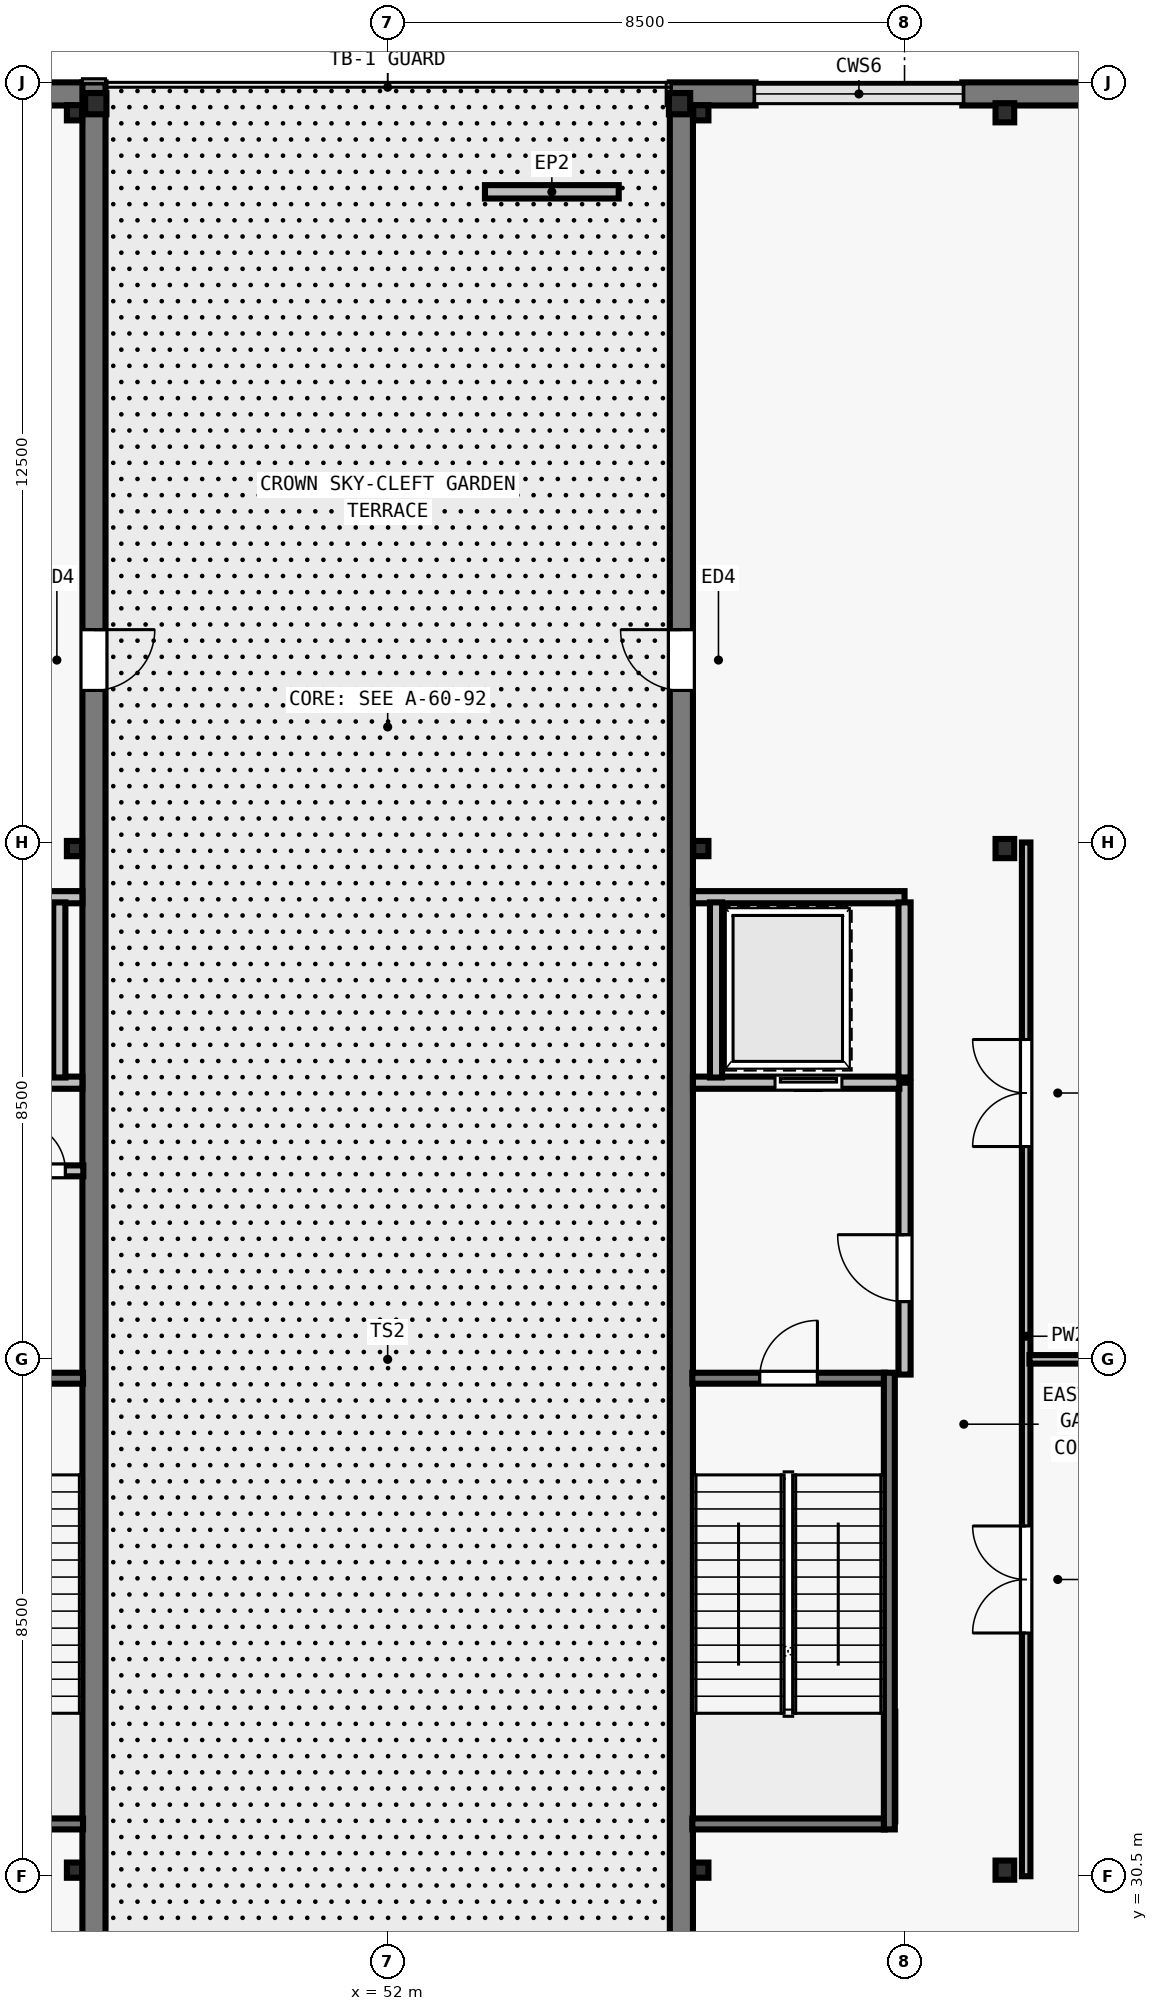
"""IFC4 building model, lengths in metres.
Left out: names, types, materials, properties, quantities, classifications, styles, units other than length and angle.
Written with IfcOpenShell. Run it as: python <this file> out.ifc"""

import sys

from ifc_helpers import new_model, si_unit, direction, frame, frame_2d, origin, origin_2d, place, context, subcontext, project, spatial, rectangle, i_section, extrude, element, fill, save


model = new_model("IFC4")
c1 = context("Model", 3, precision=1e-05, world=origin(), true_north=direction((0.0, 1.0)))
c2 = subcontext(c1, "Body", "Model", "MODEL_VIEW")
j1 = project(units=[si_unit("LENGTHUNIT", "METRE"), si_unit("PLANEANGLEUNIT", "RADIAN")], contexts=[c1])
p1 = place(None, origin())
s1 = spatial("IfcSite", under=j1, at=p1, CompositionType="ELEMENT")
p2 = place(p1, origin())
s2 = spatial("IfcBuilding", under=s1, at=p2, CompositionType="ELEMENT")
p3 = place(p2, frame((0.0, 0.0, 324.5)))
s3 = spatial("IfcBuildingStorey", under=s2, at=p3, CompositionType="ELEMENT", Elevation=324.5)
for number, where, z_axis, x_axis in (
    (1, (56.8, 59.65, 0.0), (0.0, 0.0, 1.0), (1.0, 0.0, 0.0)),
    (2, (47.2, 59.65, 0.0), (0.0, 0.0, 1.0), (1.0, 0.0, 0.0)),
):
    element("IfcColumn", number, at=place(p3, frame(where, z_axis=z_axis, x_axis=x_axis)), inside=s3, PredefinedType="COLUMN", context=c2, shape_type="SweptSolid", body=[
        extrude(i_section(OverallWidth=0.35, OverallDepth=0.35, WebThickness=0.02, FlangeThickness=0.028, at=origin_2d()), origin(), (0.0, 0.0, 1.0), 5.5),
    ])
for number, where, z_axis, x_axis in (
    (3, (46.85, 30.6, 0.0), (0.0, 0.0, 1.0), (1.0, 0.0, 0.0)),
    (4, (46.85, 47.4, 0.0), (0.0, 0.0, 1.0), (1.0, 0.0, 0.0)),
    (5, (46.85, 59.5, 0.0), (0.0, 0.0, 1.0), (1.0, 0.0, 0.0)),
):
    element("IfcColumn", number, at=place(p3, frame(where, z_axis=z_axis, x_axis=x_axis)), inside=s3, PredefinedType="PILASTER", context=c2, shape_type="SweptSolid", body=[
        extrude(i_section(OverallWidth=0.203, OverallDepth=0.203, WebThickness=0.009, FlangeThickness=0.014, FilletRadius=0.01, at=origin_2d()), origin(), (0.0, 0.0, 1.0), 5.5),
    ])
p4 = place(p3, frame((62.15, 30.6, 0.0), z_axis=(0.0, 0.0, 1.0), x_axis=(1.0, 0.0, 0.0)))
e6 = element("IfcColumn", 6, at=p4, inside=s3, PredefinedType="COLUMN", context=c2, shape_type="SweptSolid", body=[
    extrude(i_section(OverallWidth=0.307, OverallDepth=0.315, WebThickness=0.012, FlangeThickness=0.019, FilletRadius=0.016, at=origin_2d()), origin(), (0.0, 0.0, 1.0), 5.5),
])
p5 = place(p3, frame((57.15, 30.6, 0.0), z_axis=(0.0, 0.0, 1.0), x_axis=(1.0, 0.0, 0.0)))
e7 = element("IfcColumn", 7, at=p5, inside=s3, PredefinedType="PILASTER", context=c2, shape_type="SweptSolid", body=[
    extrude(i_section(OverallWidth=0.203, OverallDepth=0.203, WebThickness=0.009, FlangeThickness=0.014, FilletRadius=0.01, at=origin_2d()), origin(), (0.0, 0.0, 1.0), 5.5),
])
p6 = place(p3, frame((62.15, 47.4, 0.0), z_axis=(0.0, 0.0, 1.0), x_axis=(1.0, 0.0, 0.0)))
e8 = element("IfcColumn", 8, at=p6, inside=s3, PredefinedType="COLUMN", context=c2, shape_type="SweptSolid", body=[
    extrude(i_section(OverallWidth=0.307, OverallDepth=0.315, WebThickness=0.012, FlangeThickness=0.019, FilletRadius=0.016, at=origin_2d()), origin(), (0.0, 0.0, 1.0), 5.5),
])
p7 = place(p3, frame((57.15, 47.4, 0.0), z_axis=(0.0, 0.0, 1.0), x_axis=(1.0, 0.0, 0.0)))
e9 = element("IfcColumn", 9, at=p7, inside=s3, PredefinedType="PILASTER", context=c2, shape_type="SweptSolid", body=[
    extrude(i_section(OverallWidth=0.203, OverallDepth=0.203, WebThickness=0.009, FlangeThickness=0.014, FilletRadius=0.01, at=origin_2d()), origin(), (0.0, 0.0, 1.0), 5.5),
])
p8 = place(p3, frame((62.15, 59.5, 0.0), z_axis=(0.0, 0.0, 1.0), x_axis=(1.0, 0.0, 0.0)))
e10 = element("IfcColumn", 10, at=p8, inside=s3, PredefinedType="COLUMN", context=c2, shape_type="SweptSolid", body=[
    extrude(i_section(OverallWidth=0.307, OverallDepth=0.315, WebThickness=0.012, FlangeThickness=0.019, FilletRadius=0.016, at=origin_2d()), origin(), (0.0, 0.0, 1.0), 5.5),
])
p9 = place(p3, frame((57.15, 59.5, 0.0), z_axis=(0.0, 0.0, 1.0), x_axis=(1.0, 0.0, 0.0)))
e11 = element("IfcColumn", 11, at=p9, inside=s3, PredefinedType="PILASTER", context=c2, shape_type="SweptSolid", body=[
    extrude(i_section(OverallWidth=0.203, OverallDepth=0.203, WebThickness=0.009, FlangeThickness=0.014, FilletRadius=0.01, at=origin_2d()), origin(), (0.0, 0.0, 1.0), 5.5),
])
p10 = place(p3, frame((45.95, 59.81, 0.0), z_axis=(0.0, 0.0, 1.0), x_axis=(1.0, 0.0, 0.0)))
e12 = element("IfcWall", 12, at=p10, inside=s3, PredefinedType="SOLIDWALL", context=c2, shape_type="SweptSolid", body=[
    extrude(rectangle(XDim=1.052, YDim=0.38, at=frame_2d((0.526, 0.0))), origin(), (0.0, 0.0, 1.0), 5.25),
])
p11 = place(p3, frame((47.17, 60.0, 0.0), z_axis=(0.0, 0.0, 1.0), x_axis=(0.0, -1.0, 0.0)))
e13 = element("IfcWall", 13, at=p11, inside=s3, PredefinedType="SOLIDWALL", context=c2, shape_type="SweptSolid", body=[
    extrude(rectangle(XDim=41.642, YDim=0.38, at=frame_2d((20.821, 0.0))), origin(), (0.0, 0.0, 1.0), 5.25),
])
p12 = place(p11, frame((9.0, 0.0, 0.0)))
e14 = element("IfcOpeningElement", 14, at=p12, cuts=e13, PredefinedType="OPENING", context=c2, shape_type="SweptSolid", body=[
    extrude(rectangle(XDim=1.0, YDim=2.15, at=frame_2d((0.5, 1.075))), frame((0.0, 0.2, 0.0), z_axis=(0.0, -1.0, 0.0), x_axis=(1.0, 0.0, 0.0)), (0.0, 0.0, 1.0), 0.4),
])
p13 = place(p11, frame((33.0, 0.0, 0.0)))
e15 = element("IfcOpeningElement", 15, at=p13, cuts=e13, PredefinedType="OPENING", context=c2, shape_type="SweptSolid", body=[
    extrude(rectangle(XDim=1.0, YDim=2.15, at=frame_2d((0.5, 1.075))), frame((0.0, 0.2, 0.0), z_axis=(0.0, -1.0, 0.0), x_axis=(1.0, 0.0, 0.0)), (0.0, 0.0, 1.0), 0.4),
])
p14 = place(p3, frame((56.83, 18.0, 0.0), z_axis=(0.0, 0.0, 1.0), x_axis=(0.0, 1.0, 0.0)))
e16 = element("IfcWall", 16, at=p14, inside=s3, PredefinedType="SOLIDWALL", context=c2, shape_type="SweptSolid", body=[
    extrude(rectangle(XDim=41.642, YDim=0.38, at=frame_2d((20.821, 0.0))), origin(), (0.0, 0.0, 1.0), 5.25),
])
p15 = place(p14, frame((32.0, 0.0, 0.0)))
e17 = element("IfcOpeningElement", 17, at=p15, cuts=e16, PredefinedType="OPENING", context=c2, shape_type="SweptSolid", body=[
    extrude(rectangle(XDim=1.0, YDim=2.15, at=frame_2d((0.5, 1.075))), frame((0.0, 0.2, 0.0), z_axis=(0.0, -1.0, 0.0), x_axis=(1.0, 0.0, 0.0)), (0.0, 0.0, 1.0), 0.4),
])
p16 = place(p14, frame((8.0, 0.0, 0.0)))
e18 = element("IfcOpeningElement", 18, at=p16, cuts=e16, PredefinedType="OPENING", context=c2, shape_type="SweptSolid", body=[
    extrude(rectangle(XDim=1.0, YDim=2.15, at=frame_2d((0.5, 1.075))), frame((0.0, 0.2, 0.0), z_axis=(0.0, -1.0, 0.0), x_axis=(1.0, 0.0, 0.0)), (0.0, 0.0, 1.0), 0.4),
])
p17 = place(p3, frame((56.64, 59.81, 0.0), z_axis=(0.0, 0.0, 1.0), x_axis=(1.0, 0.0, 0.0)))
e19 = element("IfcWall", 19, at=p17, inside=s3, PredefinedType="SOLIDWALL", context=c2, shape_type="SweptSolid", body=[
    extrude(rectangle(XDim=1.41, YDim=0.38, at=frame_2d((0.705, 0.0))), origin(), (0.0, 0.0, 1.0), 5.25),
])
p18 = place(p3, frame((61.45, 59.81, 0.0), z_axis=(0.0, 0.0, 1.0), x_axis=(1.0, 0.0, 0.0)))
e20 = element("IfcWall", 20, at=p18, inside=s3, PredefinedType="SOLIDWALL", context=c2, shape_type="SweptSolid", body=[
    extrude(rectangle(XDim=5.692, YDim=0.38, at=frame_2d((2.846, 0.0))), origin(), (0.0, 0.0, 1.0), 5.25),
])
p19 = place(p3, frame((53.6, 58.2, 0.0), z_axis=(0.0, 0.0, 1.0), x_axis=(1.0, 0.0, 0.0)))
e21 = element("IfcWall", 21, at=p19, inside=s3, PredefinedType="PARAPET", context=c2, shape_type="SweptSolid", body=[
    extrude(rectangle(XDim=2.2, YDim=0.22, at=frame_2d((1.1, 0.0))), origin(), (0.0, 0.0, 1.0), 0.55),
])
p20 = place(p3, frame((43.585, 43.55, 0.0), z_axis=(0.0, 0.0, 1.0), x_axis=(1.0, 0.0, 0.0)))
e22 = element("IfcWall", 22, at=p20, inside=s3, PredefinedType="SOLIDWALL", context=c2, shape_type="SweptSolid", body=[
    extrude(rectangle(XDim=3.395, YDim=0.2, at=frame_2d((1.698, 0.0))), origin(), (0.0, 0.0, 1.0), 5.25),
])
p21 = place(p20, frame((0.265, 0.0, 0.0)))
e23 = element("IfcOpeningElement", 23, at=p21, cuts=e22, PredefinedType="OPENING", context=c2, shape_type="SweptSolid", body=[
    extrude(rectangle(XDim=1.1, YDim=2.2, at=frame_2d((0.55, 1.1))), frame((0.0, 0.11, 0.0), z_axis=(0.0, -1.0, 0.0), x_axis=(1.0, 0.0, 0.0)), (0.0, 0.0, 1.0), 0.22),
])
p22 = place(p3, frame((43.5, 46.6, 0.0), z_axis=(0.0, 0.0, 1.0), x_axis=(1.0, 0.0, 0.0)))
e24 = element("IfcWall", 24, at=p22, inside=s3, PredefinedType="SOLIDWALL", context=c2, shape_type="SweptSolid", body=[
    extrude(rectangle(XDim=3.48, YDim=0.2, at=frame_2d((1.74, 0.0))), origin(), (0.0, 0.0, 1.0), 5.25),
])
p23 = place(p3, frame((46.6, 43.635, 0.0), z_axis=(0.0, 0.0, 1.0), x_axis=(0.0, 1.0, 0.0)))
e25 = element("IfcWall", 25, at=p23, inside=s3, PredefinedType="SOLIDWALL", context=c2, shape_type="SweptSolid", body=[
    extrude(rectangle(XDim=2.88, YDim=0.2, at=frame_2d((1.44, 0.0))), origin(), (0.0, 0.0, 1.0), 5.25),
])
p24 = place(p3, frame((45.55, 42.1, 0.0), z_axis=(0.0, 0.0, 1.0), x_axis=(1.0, 0.0, 0.0)))
e26 = element("IfcWall", 26, at=p24, inside=s3, PredefinedType="SOLIDWALL", context=c2, shape_type="SweptSolid", body=[
    extrude(rectangle(XDim=1.445, YDim=0.18, at=frame_2d((0.723, 0.0))), origin(), (0.0, 0.0, 1.0), 5.25),
])
p25 = place(p24, frame((0.35, 0.0, 0.0)))
e27 = element("IfcOpeningElement", 27, at=p25, cuts=e26, PredefinedType="OPENING", context=c2, shape_type="SweptSolid", body=[
    extrude(rectangle(XDim=0.8, YDim=2.08, at=frame_2d((0.4, 1.04))), frame((0.0, 0.1, 0.0), z_axis=(0.0, -1.0, 0.0), x_axis=(1.0, 0.0, 0.0)), (0.0, 0.0, 1.0), 0.2),
])
p26 = place(p3, frame((60.5, 38.75, 0.0), z_axis=(0.0, 0.0, 1.0), x_axis=(0.0, 1.0, 0.0)))
e28 = element("IfcWall", 28, at=p26, inside=s3, PredefinedType="SOLIDWALL", context=c2, shape_type="SweptSolid", body=[
    extrude(rectangle(XDim=4.8, YDim=0.2, at=frame_2d((2.4, 0.0))), origin(), (0.0, 0.0, 1.0), 5.25),
])
p27 = place(p26, frame((1.2, 0.0, 0.0)))
e29 = element("IfcOpeningElement", 29, at=p27, cuts=e28, PredefinedType="OPENING", context=c2, shape_type="SweptSolid", body=[
    extrude(rectangle(XDim=1.1, YDim=2.15, at=frame_2d((0.55, 1.075))), frame((0.0, 0.11, 0.0), z_axis=(0.0, -1.0, 0.0), x_axis=(1.0, 0.0, 0.0)), (0.0, 0.0, 1.0), 0.22),
])
p28 = place(p3, frame((57.02, 43.55, 0.0), z_axis=(0.0, 0.0, 1.0), x_axis=(1.0, 0.0, 0.0)))
e30 = element("IfcWall", 30, at=p28, inside=s3, PredefinedType="SOLIDWALL", context=c2, shape_type="SweptSolid", body=[
    extrude(rectangle(XDim=3.395, YDim=0.2, at=frame_2d((1.698, 0.0))), origin(), (0.0, 0.0, 1.0), 5.25),
])
p29 = place(p28, frame((1.35, 0.0, 0.0)))
e31 = element("IfcOpeningElement", 31, at=p29, cuts=e30, PredefinedType="OPENING", context=c2, shape_type="SweptSolid", body=[
    extrude(rectangle(XDim=1.1, YDim=2.2, at=frame_2d((0.55, 1.1))), frame((0.0, 0.11, 0.0), z_axis=(0.0, -1.0, 0.0), x_axis=(1.0, 0.0, 0.0)), (0.0, 0.0, 1.0), 0.22),
])
p30 = place(p3, frame((57.02, 46.6, 0.0), z_axis=(0.0, 0.0, 1.0), x_axis=(1.0, 0.0, 0.0)))
e32 = element("IfcWall", 32, at=p30, inside=s3, PredefinedType="SOLIDWALL", context=c2, shape_type="SweptSolid", body=[
    extrude(rectangle(XDim=3.48, YDim=0.2, at=frame_2d((1.74, 0.0))), origin(), (0.0, 0.0, 1.0), 5.25),
])
for number, where, z_axis, x_axis in (
    (33, (57.4, 43.635, 0.0), (0.0, 0.0, 1.0), (0.0, 1.0, 0.0)),
    (34, (60.5, 43.635, 0.0), (0.0, 0.0, 1.0), (0.0, 1.0, 0.0)),
):
    element("IfcWall", number, at=place(p3, frame(where, z_axis=z_axis, x_axis=x_axis)), inside=s3, PredefinedType="SOLIDWALL", context=c2, shape_type="SweptSolid", body=[
        extrude(rectangle(XDim=2.88, YDim=0.2, at=frame_2d((1.44, 0.0))), origin(), (0.0, 0.0, 1.0), 5.25),
    ])
p31 = place(p3, frame((62.5, 30.5, 0.0), z_axis=(0.0, 0.0, 1.0), x_axis=(0.0, 1.0, 0.0)))
e35 = element("IfcWall", 35, at=p31, inside=s3, PredefinedType="PARTITIONING", context=c2, shape_type="SweptSolid", body=[
    extrude(rectangle(XDim=17.0, YDim=0.14, at=frame_2d((8.5, 0.0))), origin(), (0.0, 0.0, 1.0), 5.25),
])
p32 = place(p31, frame((4.0, 0.0, 0.0)))
e36 = element("IfcOpeningElement", 36, at=p32, cuts=e35, PredefinedType="OPENING", context=c2, shape_type="SweptSolid", body=[
    extrude(rectangle(XDim=1.76, YDim=2.2, at=frame_2d((0.88, 1.1))), frame((0.0, 0.08, 0.0), z_axis=(0.0, -1.0, 0.0), x_axis=(1.0, 0.0, 0.0)), (0.0, 0.0, 1.0), 0.16),
])
p33 = place(p31, frame((12.0, 0.0, 0.0)))
e37 = element("IfcOpeningElement", 37, at=p33, cuts=e35, PredefinedType="OPENING", context=c2, shape_type="SweptSolid", body=[
    extrude(rectangle(XDim=1.76, YDim=2.2, at=frame_2d((0.88, 1.1))), frame((0.0, 0.08, 0.0), z_axis=(0.0, -1.0, 0.0), x_axis=(1.0, 0.0, 0.0)), (0.0, 0.0, 1.0), 0.16),
])
p34 = place(p3, frame((62.555, 39.0, 0.0), z_axis=(0.0, 0.0, 1.0), x_axis=(1.0, 0.0, 0.0)))
e38 = element("IfcWall", 38, at=p34, inside=s3, PredefinedType="PARTITIONING", context=c2, shape_type="SweptSolid", body=[
    extrude(rectangle(XDim=10.08, YDim=0.14, at=frame_2d((5.04, 0.0))), origin(), (0.0, 0.0, 1.0), 5.25),
])
p35 = place(p3, frame((43.825, 38.69, 0.0), z_axis=(0.0, 0.0, 1.0), x_axis=(1.0, 0.0, 0.0)))
e39 = element("IfcWall", 39, at=p35, inside=s3, PredefinedType="SOLIDWALL", context=c2, shape_type="SweptSolid", body=[
    extrude(rectangle(XDim=3.165, YDim=0.18, at=frame_2d((1.583, 0.0))), origin(), (0.0, 0.0, 1.0), 5.25),
])
p36 = place(p35, frame((1.107, 0.0, 0.0)))
e40 = element("IfcOpeningElement", 40, at=p36, cuts=e39, PredefinedType="OPENING", context=c2, shape_type="SweptSolid", body=[
    extrude(rectangle(XDim=0.95, YDim=2.15, at=frame_2d((0.475, 1.075))), frame((0.0, 0.1, 0.0), z_axis=(0.0, -1.0, 0.0), x_axis=(1.0, 0.0, 0.0)), (0.0, 0.0, 1.0), 0.2),
])
p37 = place(p3, frame((43.825, 31.36, 0.0), z_axis=(0.0, 0.0, 1.0), x_axis=(1.0, 0.0, 0.0)))
e41 = element("IfcWall", 41, at=p37, inside=s3, PredefinedType="SOLIDWALL", context=c2, shape_type="SweptSolid", body=[
    extrude(rectangle(XDim=3.165, YDim=0.18, at=frame_2d((1.583, 0.0))), origin(), (0.0, 0.0, 1.0), 5.25),
])
p38 = place(p3, frame((57.01, 38.69, 0.0), z_axis=(0.0, 0.0, 1.0), x_axis=(1.0, 0.0, 0.0)))
e42 = element("IfcWall", 42, at=p38, inside=s3, PredefinedType="SOLIDWALL", context=c2, shape_type="SweptSolid", body=[
    extrude(rectangle(XDim=3.165, YDim=0.18, at=frame_2d((1.583, 0.0))), origin(), (0.0, 0.0, 1.0), 5.25),
])
p39 = place(p38, frame((1.107, 0.0, 0.0)))
e43 = element("IfcOpeningElement", 43, at=p39, cuts=e42, PredefinedType="OPENING", context=c2, shape_type="SweptSolid", body=[
    extrude(rectangle(XDim=0.95, YDim=2.15, at=frame_2d((0.475, 1.075))), frame((0.0, 0.1, 0.0), z_axis=(0.0, -1.0, 0.0), x_axis=(1.0, 0.0, 0.0)), (0.0, 0.0, 1.0), 0.2),
])
p40 = place(p3, frame((57.01, 31.36, 0.0), z_axis=(0.0, 0.0, 1.0), x_axis=(1.0, 0.0, 0.0)))
e44 = element("IfcWall", 44, at=p40, inside=s3, PredefinedType="SOLIDWALL", context=c2, shape_type="SweptSolid", body=[
    extrude(rectangle(XDim=3.165, YDim=0.18, at=frame_2d((1.583, 0.0))), origin(), (0.0, 0.0, 1.0), 5.25),
])
p41 = place(p3, frame((60.25, 38.78, 0.0), z_axis=(0.0, 0.0, 1.0), x_axis=(0.0, -1.0, 0.0)))
e45 = element("IfcWall", 45, at=p41, inside=s3, PredefinedType="SOLIDWALL", context=c2, shape_type="SweptSolid", body=[
    extrude(rectangle(XDim=7.51, YDim=0.18, at=frame_2d((3.755, 0.0))), origin(), (0.0, 0.0, 1.0), 5.25),
])
p42 = place(p12, origin())
e46 = element("IfcDoor", 46, at=p42, inside=s3, OperationType="SINGLE_SWING_LEFT", PredefinedType="DOOR", context=c2, shape_type="SweptSolid", body=[
    extrude(rectangle(XDim=1.0, YDim=2.15, at=frame_2d((0.5, 1.075))), frame((0.0, 0.025, 0.0), z_axis=(0.0, -1.0, 0.0), x_axis=(1.0, 0.0, 0.0)), (0.0, 0.0, 1.0), 0.05),
])
fill(e14, e46)
p43 = place(p15, origin())
e47 = element("IfcDoor", 47, at=p43, inside=s3, OperationType="SINGLE_SWING_RIGHT", PredefinedType="DOOR", context=c2, shape_type="SweptSolid", body=[
    extrude(rectangle(XDim=1.0, YDim=2.15, at=frame_2d((0.5, 1.075))), frame((0.0, 0.025, 0.0), z_axis=(0.0, -1.0, 0.0), x_axis=(1.0, 0.0, 0.0)), (0.0, 0.0, 1.0), 0.05),
])
fill(e17, e47)
p44 = place(p25, origin())
e48 = element("IfcDoor", 48, at=p44, inside=s3, OperationType="SINGLE_SWING_LEFT", PredefinedType="DOOR", context=c2, shape_type="SweptSolid", body=[
    extrude(rectangle(XDim=0.8, YDim=2.08, at=frame_2d((0.4, 1.04))), frame((0.0, 0.025, 0.0), z_axis=(0.0, -1.0, 0.0), x_axis=(1.0, 0.0, 0.0)), (0.0, 0.0, 1.0), 0.05),
])
fill(e27, e48)
p45 = place(p27, origin())
e49 = element("IfcDoor", 49, at=p45, inside=s3, OperationType="SINGLE_SWING_RIGHT", PredefinedType="DOOR", context=c2, shape_type="SweptSolid", body=[
    extrude(rectangle(XDim=1.1, YDim=2.15, at=frame_2d((0.55, 1.075))), frame((0.0, 0.025, 0.0), z_axis=(0.0, -1.0, 0.0), x_axis=(1.0, 0.0, 0.0)), (0.0, 0.0, 1.0), 0.05),
])
fill(e29, e49)
p46 = place(p29, origin())
e50 = element("IfcDoor", 50, at=p46, inside=s3, OperationType="SLIDING_TO_LEFT", PredefinedType="DOOR", context=c2, shape_type="SweptSolid", body=[
    extrude(rectangle(XDim=1.1, YDim=2.2, at=frame_2d((0.55, 1.1))), frame((0.0, 0.025, 0.0), z_axis=(0.0, -1.0, 0.0), x_axis=(1.0, 0.0, 0.0)), (0.0, 0.0, 1.0), 0.05),
])
fill(e31, e50)
p47 = place(p32, origin())
e51 = element("IfcDoor", 51, at=p47, inside=s3, OperationType="DOUBLE_DOOR_SINGLE_SWING", PredefinedType="DOOR", context=c2, shape_type="SweptSolid", body=[
    extrude(rectangle(XDim=1.76, YDim=2.2, at=frame_2d((0.88, 1.1))), frame((0.0, 0.025, 0.0), z_axis=(0.0, -1.0, 0.0), x_axis=(1.0, 0.0, 0.0)), (0.0, 0.0, 1.0), 0.05),
])
fill(e36, e51)
p48 = place(p33, origin())
e52 = element("IfcDoor", 52, at=p48, inside=s3, OperationType="DOUBLE_DOOR_SINGLE_SWING", PredefinedType="DOOR", context=c2, shape_type="SweptSolid", body=[
    extrude(rectangle(XDim=1.76, YDim=2.2, at=frame_2d((0.88, 1.1))), frame((0.0, 0.025, 0.0), z_axis=(0.0, -1.0, 0.0), x_axis=(1.0, 0.0, 0.0)), (0.0, 0.0, 1.0), 0.05),
])
fill(e37, e52)
p49 = place(p39, origin())
e53 = element("IfcDoor", 53, at=p49, inside=s3, OperationType="SINGLE_SWING_RIGHT", PredefinedType="DOOR", context=c2, shape_type="SweptSolid", body=[
    extrude(rectangle(XDim=0.95, YDim=2.15, at=frame_2d((0.475, 1.075))), frame((0.0, 0.025, 0.0), z_axis=(0.0, -1.0, 0.0), x_axis=(1.0, 0.0, 0.0)), (0.0, 0.0, 1.0), 0.05),
])
fill(e43, e53)
save(model, sys.argv[1])
